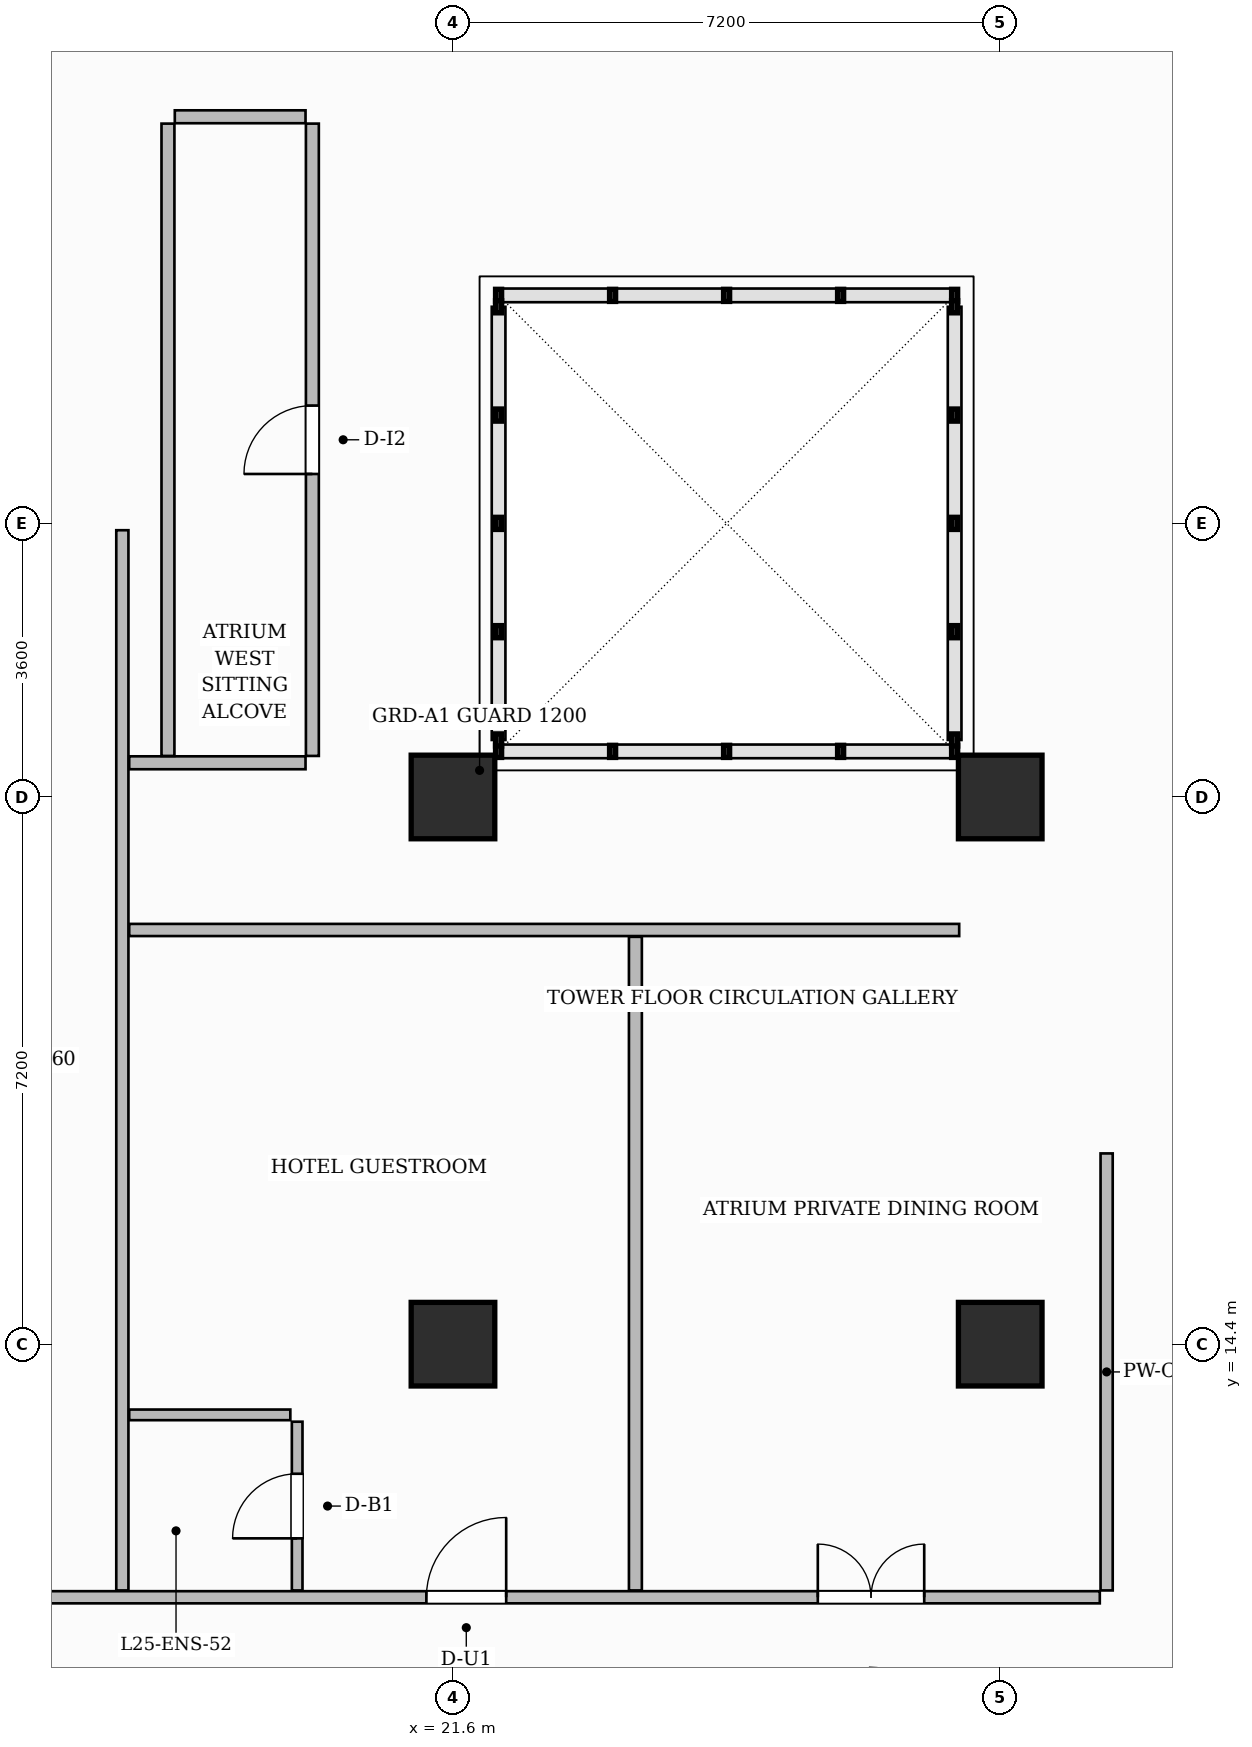
"""IFC4 building model, lengths in metres.
Left out: names, types, materials, properties, quantities, classifications, styles, units other than length and angle.
Written with IfcOpenShell. Run it as: python <this file> out.ifc"""

import sys

from ifc_helpers import new_model, si_unit, direction, frame, frame_2d, origin, origin_2d, place, context, subcontext, project, spatial, rectangle, extrude, source, transform, mapped, element, fill, save


model = new_model("IFC4")
c1 = context("Model", 3, precision=1e-05, world=origin(), true_north=direction((0.0, 1.0)))
c2 = subcontext(c1, "Body", "Model", "MODEL_VIEW")
j1 = project(units=[si_unit("LENGTHUNIT", "METRE"), si_unit("PLANEANGLEUNIT", "RADIAN")], contexts=[c1])
p1 = place(None, origin())
s1 = spatial("IfcSite", under=j1, at=p1, CompositionType="ELEMENT")
p2 = place(p1, origin())
s2 = spatial("IfcBuilding", under=s1, at=p2, CompositionType="ELEMENT")
p3 = place(p2, frame((0.0, 0.0, 102.7)))
s3 = spatial("IfcBuildingStorey", under=s2, at=p3, CompositionType="ELEMENT", Elevation=102.7)
m1 = source(origin(), c2, "Body", "SweptSolid", [
    extrude(rectangle(XDim=1.1, YDim=1.1, at=origin_2d()), origin(), (0.0, 0.0, 1.0), 3.7),
])
for number, where, z_axis, x_axis in (
    (1, (21.6, 14.4, 0.0), (0.0, 0.0, 1.0), (1.0, 0.0, 0.0)),
    (2, (21.6, 21.6, 0.0), (0.0, 0.0, 1.0), (1.0, 0.0, 0.0)),
    (3, (28.8, 14.4, 0.0), (0.0, 0.0, 1.0), (1.0, 0.0, 0.0)),
    (4, (28.8, 21.6, 0.0), (0.0, 0.0, 1.0), (1.0, 0.0, 0.0)),
):
    element("IfcColumn", number, at=place(p3, frame(where, z_axis=z_axis, x_axis=x_axis)), inside=s3, PredefinedType="COLUMN", context=c2, shape_type="MappedRepresentation", body=[
        mapped(m1, transform((0.0, 0.0, 0.0), scale=1.0)),
    ])
p4 = place(p3, frame((14.548, 11.07, 0.0), z_axis=(0.0, 0.0, 1.0), x_axis=(1.0, 0.0, 0.0)))
e5 = element("IfcWall", 5, at=p4, inside=s3, PredefinedType="PARTITIONING", context=c2, shape_type="SweptSolid", body=[
    extrude(rectangle(XDim=15.562, YDim=0.16, at=frame_2d((7.781, 0.0))), origin(), (0.0, 0.0, 1.0), 3.4),
])
p5 = place(p4, frame((6.702, 0.0, 0.0)))
e6 = element("IfcOpeningElement", 6, at=p5, cuts=e5, PredefinedType="OPENING", context=c2, shape_type="SweptSolid", body=[
    extrude(rectangle(XDim=1.05, YDim=2.25, at=frame_2d((0.525, 1.125))), frame((0.0, 0.09, 0.0), z_axis=(0.0, -1.0, 0.0), x_axis=(1.0, 0.0, 0.0)), (0.0, 0.0, 1.0), 0.18),
])
p6 = place(p4, frame((11.852, 0.0, 0.0)))
e7 = element("IfcOpeningElement", 7, at=p6, cuts=e5, PredefinedType="OPENING", context=c2, shape_type="SweptSolid", body=[
    extrude(rectangle(XDim=1.4, YDim=2.35, at=frame_2d((0.7, 1.175))), frame((0.0, 0.09, 0.0), z_axis=(0.0, -1.0, 0.0), x_axis=(1.0, 0.0, 0.0)), (0.0, 0.0, 1.0), 0.18),
])
p7 = place(p3, frame((30.2, 11.16, 0.0), z_axis=(0.0, 0.0, 1.0), x_axis=(0.0, 1.0, 0.0)))
e8 = element("IfcWall", 8, at=p7, inside=s3, PredefinedType="PARTITIONING", context=c2, shape_type="SweptSolid", body=[
    extrude(rectangle(XDim=5.75, YDim=0.16, at=frame_2d((2.875, 0.0))), origin(), (0.0, 0.0, 1.0), 3.4),
])
p8 = place(p3, frame((17.25, 11.16, 0.0), z_axis=(0.0, 0.0, 1.0), x_axis=(0.0, 1.0, 0.0)))
e9 = element("IfcWall", 9, at=p8, inside=s3, PredefinedType="PARTITIONING", context=c2, shape_type="SweptSolid", body=[
    extrude(rectangle(XDim=13.95, YDim=0.16, at=frame_2d((6.975, 0.0))), origin(), (0.0, 0.0, 1.0), 3.4),
])
p9 = place(p3, frame((17.34, 22.05, 0.0), z_axis=(0.0, 0.0, 1.0), x_axis=(1.0, 0.0, 0.0)))
e10 = element("IfcWall", 10, at=p9, inside=s3, PredefinedType="PARTITIONING", context=c2, shape_type="SweptSolid", body=[
    extrude(rectangle(XDim=2.32, YDim=0.17, at=frame_2d((1.16, 0.0))), origin(), (0.0, 0.0, 1.0), 3.4),
])
p10 = place(p3, frame((17.94, 30.55, 0.0), z_axis=(0.0, 0.0, 1.0), x_axis=(1.0, 0.0, 0.0)))
e11 = element("IfcWall", 11, at=p10, inside=s3, PredefinedType="PARTITIONING", context=c2, shape_type="SweptSolid", body=[
    extrude(rectangle(XDim=1.72, YDim=0.17, at=frame_2d((0.86, 0.0))), origin(), (0.0, 0.0, 1.0), 3.4),
])
p11 = place(p3, frame((17.85, 22.14, 0.0), z_axis=(0.0, 0.0, 1.0), x_axis=(0.0, 1.0, 0.0)))
e12 = element("IfcWall", 12, at=p11, inside=s3, PredefinedType="PARTITIONING", context=c2, shape_type="SweptSolid", body=[
    extrude(rectangle(XDim=8.32, YDim=0.17, at=frame_2d((4.16, 0.0))), origin(), (0.0, 0.0, 1.0), 3.4),
])
p12 = place(p3, frame((19.75, 22.14, 0.0), z_axis=(0.0, 0.0, 1.0), x_axis=(0.0, 1.0, 0.0)))
e13 = element("IfcWall", 13, at=p12, inside=s3, PredefinedType="PARTITIONING", context=c2, shape_type="SweptSolid", body=[
    extrude(rectangle(XDim=8.32, YDim=0.17, at=frame_2d((4.16, 0.0))), origin(), (0.0, 0.0, 1.0), 3.4),
])
p13 = place(p12, frame((3.71, 0.0, 0.0)))
e14 = element("IfcOpeningElement", 14, at=p13, cuts=e13, PredefinedType="OPENING", context=c2, shape_type="SweptSolid", body=[
    extrude(rectangle(XDim=0.9, YDim=2.15, at=frame_2d((0.45, 1.075))), frame((0.0, 0.095, 0.0), z_axis=(0.0, -1.0, 0.0), x_axis=(1.0, 0.0, 0.0)), (0.0, 0.0, 1.0), 0.19),
])
p14 = place(p3, frame((17.34, 19.85, 0.0), z_axis=(0.0, 0.0, 1.0), x_axis=(1.0, 0.0, 0.0)))
e15 = element("IfcWall", 15, at=p14, inside=s3, PredefinedType="PARTITIONING", context=c2, shape_type="SweptSolid", body=[
    extrude(rectangle(XDim=10.92, YDim=0.16, at=frame_2d((5.46, 0.0))), origin(), (0.0, 0.0, 1.0), 3.4),
])
p15 = place(p3, frame((24.0, 11.16, 0.0), z_axis=(0.0, 0.0, 1.0), x_axis=(0.0, 1.0, 0.0)))
e16 = element("IfcWall", 16, at=p15, inside=s3, PredefinedType="PARTITIONING", context=c2, shape_type="SweptSolid", body=[
    extrude(rectangle(XDim=8.6, YDim=0.17, at=frame_2d((4.3, 0.0))), origin(), (0.0, 0.0, 1.0), 3.4),
])
p16 = place(p3, frame((19.55, 11.16, 0.0), z_axis=(0.0, 0.0, 1.0), x_axis=(0.0, 1.0, 0.0)))
e17 = element("IfcWall", 17, at=p16, inside=s3, PredefinedType="PARTITIONING", context=c2, shape_type="SweptSolid", body=[
    extrude(rectangle(XDim=2.22, YDim=0.14, at=frame_2d((1.11, 0.0))), origin(), (0.0, 0.0, 1.0), 3.4),
])
p17 = place(p16, frame((0.685, 0.0, 0.0)))
e18 = element("IfcOpeningElement", 18, at=p17, cuts=e17, PredefinedType="OPENING", context=c2, shape_type="SweptSolid", body=[
    extrude(rectangle(XDim=0.85, YDim=2.1, at=frame_2d((0.425, 1.05))), frame((0.0, 0.08, 0.0), z_axis=(0.0, -1.0, 0.0), x_axis=(1.0, 0.0, 0.0)), (0.0, 0.0, 1.0), 0.16),
])
p18 = place(p3, frame((17.34, 13.47, 0.0), z_axis=(0.0, 0.0, 1.0), x_axis=(1.0, 0.0, 0.0)))
e19 = element("IfcWall", 19, at=p18, inside=s3, PredefinedType="PARTITIONING", context=c2, shape_type="SweptSolid", body=[
    extrude(rectangle(XDim=2.12, YDim=0.14, at=frame_2d((1.06, 0.0))), origin(), (0.0, 0.0, 1.0), 3.4),
])
m2 = source(origin(), c2, "Body", "SweptSolid", [
    extrude(rectangle(XDim=0.9, YDim=2.15, at=frame_2d((0.45, 1.075))), frame((0.0, 0.025, 0.0), z_axis=(0.0, -1.0, 0.0), x_axis=(1.0, 0.0, 0.0)), (0.0, 0.0, 1.0), 0.05),
])
p19 = place(p13, origin())
e20 = element("IfcDoor", 20, at=p19, inside=s3, OperationType="SINGLE_SWING_LEFT", PredefinedType="DOOR", context=c2, shape_type="MappedRepresentation", body=[
    mapped(m2, transform((0.0, 0.0, 0.0), scale=1.0)),
])
fill(e14, e20)
m3 = source(origin(), c2, "Body", "SweptSolid", [
    extrude(rectangle(XDim=0.85, YDim=2.1, at=frame_2d((0.425, 1.05))), frame((0.0, 0.025, 0.0), z_axis=(0.0, -1.0, 0.0), x_axis=(1.0, 0.0, 0.0)), (0.0, 0.0, 1.0), 0.05),
])
p20 = place(p17, origin())
e21 = element("IfcDoor", 21, at=p20, inside=s3, OperationType="SINGLE_SWING_LEFT", PredefinedType="DOOR", context=c2, shape_type="MappedRepresentation", body=[
    mapped(m3, transform((0.0, 0.0, 0.0), scale=1.0)),
])
fill(e18, e21)
m4 = source(origin(), c2, "Body", "SweptSolid", [
    extrude(rectangle(XDim=1.05, YDim=2.25, at=frame_2d((0.525, 1.125))), frame((0.0, 0.025, 0.0), z_axis=(0.0, -1.0, 0.0), x_axis=(1.0, 0.0, 0.0)), (0.0, 0.0, 1.0), 0.05),
])
p21 = place(p5, origin())
e22 = element("IfcDoor", 22, at=p21, inside=s3, OperationType="SINGLE_SWING_RIGHT", PredefinedType="DOOR", context=c2, shape_type="MappedRepresentation", body=[
    mapped(m4, transform((0.0, 0.0, 0.0), scale=1.0)),
])
fill(e6, e22)
m5 = source(origin(), c2, "Body", "SweptSolid", [
    extrude(rectangle(XDim=1.4, YDim=2.35, at=frame_2d((0.7, 1.175))), frame((0.0, 0.025, 0.0), z_axis=(0.0, -1.0, 0.0), x_axis=(1.0, 0.0, 0.0)), (0.0, 0.0, 1.0), 0.05),
])
p22 = place(p6, origin())
e23 = element("IfcDoor", 23, at=p22, inside=s3, OperationType="DOUBLE_DOOR_SINGLE_SWING", PredefinedType="DOOR", context=c2, shape_type="MappedRepresentation", body=[
    mapped(m5, transform((0.0, 0.0, 0.0), scale=1.0)),
])
fill(e7, e23)
save(model, sys.argv[1])
